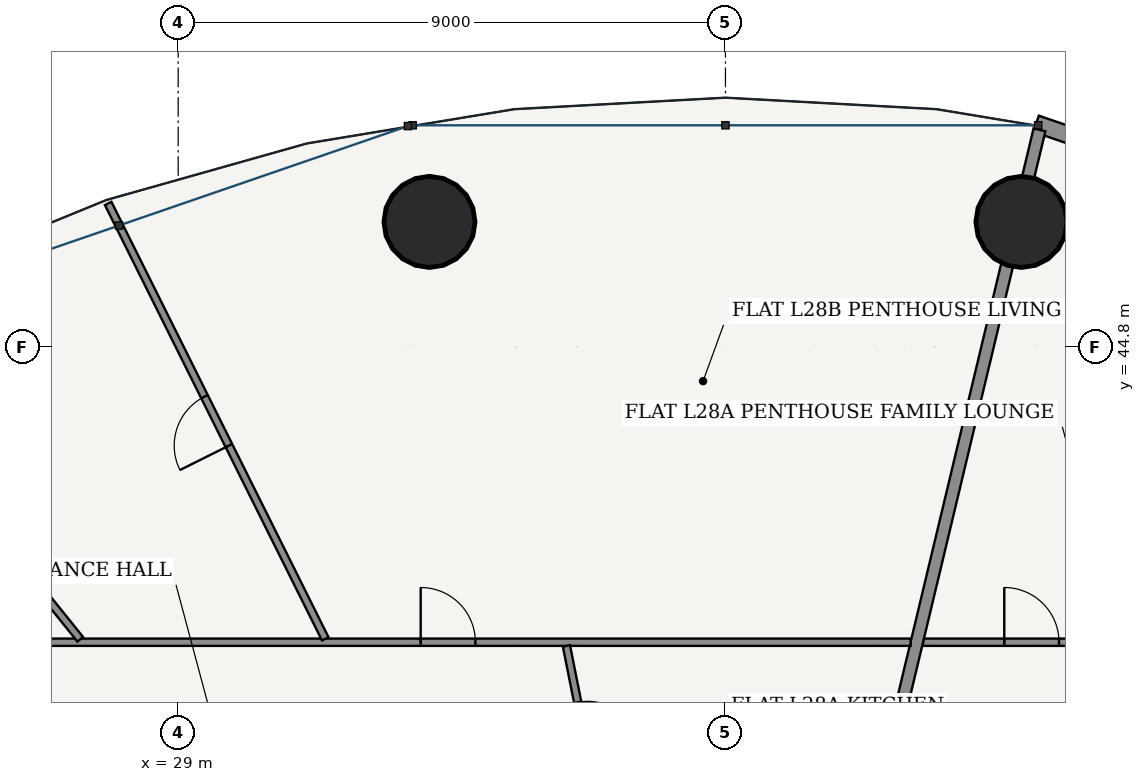
"""IFC4 building model, lengths in metres.
Left out: names, types, materials, properties, quantities, classifications, styles, units other than length and angle.
Written with IfcOpenShell. Run it as: python <this file> out.ifc"""

import sys

from ifc_helpers import new_model, si_unit, direction, frame, frame_2d, origin, origin_2d, place, context, subcontext, project, spatial, rectangle, hollow_circle, extrude, source, transform, mapped, element, fill, save


model = new_model("IFC4")
c1 = context("Model", 3, precision=1e-05, world=origin(), true_north=direction((-0.2419218956, 0.970295726276)))
c2 = subcontext(c1, "Body", "Model", "MODEL_VIEW")
j1 = project(units=[si_unit("LENGTHUNIT", "METRE"), si_unit("PLANEANGLEUNIT", "RADIAN")], contexts=[c1])
p1 = place(None, origin())
s1 = spatial("IfcSite", under=j1, at=p1, CompositionType="ELEMENT")
p2 = place(p1, origin())
s2 = spatial("IfcBuilding", under=s1, at=p2, CompositionType="ELEMENT")
p3 = place(p2, frame((0.0, 0.0, 108.6)))
s3 = spatial("IfcBuildingStorey", under=s2, at=p3, CompositionType="ELEMENT", Elevation=108.6)
for number, where, z_axis, x_axis in (
    (1, (42.867, 46.857, 0.0), (0.0, 0.0, 1.0), (1.0, 0.0, 0.0)),
    (2, (33.133, 46.857, 0.0), (0.0, 0.0, 1.0), (1.0, 0.0, 0.0)),
):
    element("IfcColumn", number, at=place(p3, frame(where, z_axis=z_axis, x_axis=x_axis)), inside=s3, PredefinedType="COLUMN", context=c2, shape_type="SweptSolid", body=[
        extrude(hollow_circle(Radius=0.75, WallThickness=0.045, at=origin_2d()), origin(), (0.0, 0.0, 1.0), 3.6),
    ])
p4 = place(p3, frame((52.837, 45.125, 0.0), z_axis=(0.0, 0.0, 1.0), x_axis=(-0.945597432299, 0.325339047809, 0.0)))
e3 = element("IfcWall", 3, at=p4, inside=s3, PredefinedType="SOLIDWALL", context=c2, shape_type="SweptSolid", body=[
    extrude(rectangle(XDim=10.289, YDim=0.28, at=frame_2d((5.145, 0.0))), origin(), (0.0, 0.0, 1.0), 3.325),
])
p5 = place(p4, frame((1.728, 0.0, 0.85)))
e4 = element("IfcOpeningElement", 4, at=p5, cuts=e3, PredefinedType="OPENING", context=c2, shape_type="SweptSolid", body=[
    extrude(rectangle(XDim=2.1, YDim=1.95, at=frame_2d((1.05, 0.975))), frame((0.0, 0.15, 0.0), z_axis=(0.0, -1.0, 0.0), x_axis=(1.0, 0.0, 0.0)), (0.0, 0.0, 1.0), 0.3),
])
p6 = place(p4, frame((6.461, 0.0, 0.85)))
e5 = element("IfcOpeningElement", 5, at=p6, cuts=e3, PredefinedType="OPENING", context=c2, shape_type="SweptSolid", body=[
    extrude(rectangle(XDim=2.1, YDim=1.95, at=frame_2d((1.05, 0.975))), frame((0.0, 0.15, 0.0), z_axis=(0.0, -1.0, 0.0), x_axis=(1.0, 0.0, 0.0)), (0.0, 0.0, 1.0), 0.3),
])
p7 = place(p3, frame((41.249, 39.945, 0.0), z_axis=(0.0, 0.0, 1.0), x_axis=(1.0, 0.0, 0.0)))
e6 = element("IfcWall", 6, at=p7, inside=s3, PredefinedType="PARTITIONING", context=c2, shape_type="SweptSolid", body=[
    extrude(rectangle(XDim=10.896, YDim=0.12, at=frame_2d((5.448, 0.0))), origin(), (0.0, 0.0, 1.0), 2.767),
])
p8 = place(p7, frame((1.336, 0.0, 0.0)))
e7 = element("IfcOpeningElement", 7, at=p8, cuts=e6, PredefinedType="OPENING", context=c2, shape_type="SweptSolid", body=[
    extrude(rectangle(XDim=0.9, YDim=2.15, at=frame_2d((0.45, 1.075))), frame((0.0, 0.07, 0.0), z_axis=(0.0, -1.0, 0.0), x_axis=(1.0, 0.0, 0.0)), (0.0, 0.0, 1.0), 0.14),
])
p9 = place(p3, frame((40.486, 37.185, 0.0), z_axis=(0.0, 0.0, 1.0), x_axis=(0.232834224261, 0.972516438942, 0.0)))
e8 = element("IfcWall", 8, at=p9, inside=s3, PredefinedType="PARTITIONING", context=c2, shape_type="SweptSolid", body=[
    extrude(rectangle(XDim=11.502, YDim=0.2, at=frame_2d((5.751, 0.0))), origin(), (0.0, 0.0, 1.0), 2.767),
])
p10 = place(p3, frame((23.855, 39.945, 0.0), z_axis=(0.0, 0.0, 1.0), x_axis=(1.0, 0.0, 0.0)))
e9 = element("IfcWall", 9, at=p10, inside=s3, PredefinedType="PARTITIONING", context=c2, shape_type="SweptSolid", body=[
    extrude(rectangle(XDim=17.19, YDim=0.12, at=frame_2d((8.595, 0.0))), origin(), (0.0, 0.0, 1.0), 2.767),
])
p11 = place(p10, frame((9.133, 0.0, 0.0)))
e10 = element("IfcOpeningElement", 10, at=p11, cuts=e9, PredefinedType="OPENING", context=c2, shape_type="SweptSolid", body=[
    extrude(rectangle(XDim=0.9, YDim=2.15, at=frame_2d((0.45, 1.075))), frame((0.0, 0.07, 0.0), z_axis=(0.0, -1.0, 0.0), x_axis=(1.0, 0.0, 0.0)), (0.0, 0.0, 1.0), 0.14),
])
p12 = place(p3, frame((31.419, 40.0, 0.0), z_axis=(0.0, 0.0, 1.0), x_axis=(-0.446188142997, 0.894939182877, 0.0)))
e11 = element("IfcWall", 11, at=p12, inside=s3, PredefinedType="PARTITIONING", context=c2, shape_type="SweptSolid", body=[
    extrude(rectangle(XDim=8.002, YDim=0.12, at=frame_2d((4.001, 0.0))), origin(), (0.0, 0.0, 1.0), 2.767),
])
p13 = place(p12, frame((3.551, 0.0, 0.0)))
e12 = element("IfcOpeningElement", 12, at=p13, cuts=e11, PredefinedType="OPENING", context=c2, shape_type="SweptSolid", body=[
    extrude(rectangle(XDim=0.9, YDim=2.15, at=frame_2d((0.45, 1.075))), frame((0.0, 0.07, 0.0), z_axis=(0.0, -1.0, 0.0), x_axis=(1.0, 0.0, 0.0)), (0.0, 0.0, 1.0), 0.14),
])
p14 = place(p3, frame((27.389, 39.993, 0.0), z_axis=(0.0, 0.0, 1.0), x_axis=(-0.626719700294, 0.779244773651, 0.0)))
e13 = element("IfcWall", 13, at=p14, inside=s3, PredefinedType="PARTITIONING", context=c2, shape_type="SweptSolid", body=[
    extrude(rectangle(XDim=6.537, YDim=0.12, at=frame_2d((3.269, 0.0))), origin(), (0.0, 0.0, 1.0), 2.767),
])
p15 = place(p3, frame((35.925, 37.185, 0.0), z_axis=(0.0, 0.0, 1.0), x_axis=(-0.196013794811, 0.980601138202, 0.0)))
e14 = element("IfcWall", 14, at=p15, inside=s3, PredefinedType="PARTITIONING", context=c2, shape_type="SweptSolid", body=[
    extrude(rectangle(XDim=2.753, YDim=0.12, at=frame_2d((1.376, 0.0))), origin(), (0.0, 0.0, 1.0), 3.325),
])
p16 = place(p15, frame((0.946, 0.0, 0.0)))
e15 = element("IfcOpeningElement", 15, at=p16, cuts=e14, PredefinedType="OPENING", context=c2, shape_type="SweptSolid", body=[
    extrude(rectangle(XDim=0.86, YDim=2.15, at=frame_2d((0.43, 1.075))), frame((0.0, 0.07, 0.0), z_axis=(0.0, -1.0, 0.0), x_axis=(1.0, 0.0, 0.0)), (0.0, 0.0, 1.0), 0.14),
])
p17 = place(p3, frame((28.335, 37.185, 0.0), z_axis=(0.0, 0.0, 1.0), x_axis=(-0.681236086606, 0.732063791145, 0.0)))
e16 = element("IfcWall", 16, at=p17, inside=s3, PredefinedType="PARTITIONING", context=c2, shape_type="SweptSolid", body=[
    extrude(rectangle(XDim=3.708, YDim=0.12, at=frame_2d((1.854, 0.0))), origin(), (0.0, 0.0, 1.0), 2.767),
])
p18 = place(p17, frame((1.404, 0.0, 0.0)))
e17 = element("IfcOpeningElement", 17, at=p18, cuts=e16, PredefinedType="OPENING", context=c2, shape_type="SweptSolid", body=[
    extrude(rectangle(XDim=0.9, YDim=2.15, at=frame_2d((0.45, 1.075))), frame((0.0, 0.07, 0.0), z_axis=(0.0, -1.0, 0.0), x_axis=(1.0, 0.0, 0.0)), (0.0, 0.0, 1.0), 0.14),
])
m1 = source(origin(), c2, "Body", "SweptSolid", [
    extrude(rectangle(XDim=0.9, YDim=2.15, at=frame_2d((0.45, 1.075))), frame((0.0, 0.025, 0.0), z_axis=(0.0, -1.0, 0.0), x_axis=(1.0, 0.0, 0.0)), (0.0, 0.0, 1.0), 0.05),
])
p19 = place(p8, origin())
e18 = element("IfcDoor", 18, at=p19, inside=s3, OperationType="SINGLE_SWING_LEFT", PredefinedType="DOOR", context=c2, shape_type="MappedRepresentation", body=[
    mapped(m1, transform((0.0, 0.0, 0.0), scale=1.0)),
])
fill(e7, e18)
m2 = source(origin(), c2, "Body", "SweptSolid", [
    extrude(rectangle(XDim=0.86, YDim=2.15, at=frame_2d((0.43, 1.075))), frame((0.0, 0.025, 0.0), z_axis=(0.0, -1.0, 0.0), x_axis=(1.0, 0.0, 0.0)), (0.0, 0.0, 1.0), 0.05),
])
p20 = place(p16, frame((0.86, 0.0, 0.0), z_axis=(0.0, 0.0, 1.0), x_axis=(-1.0, 0.0, 0.0)))
e19 = element("IfcDoor", 19, at=p20, inside=s3, OperationType="SINGLE_SWING_RIGHT", PredefinedType="DOOR", context=c2, shape_type="MappedRepresentation", body=[
    mapped(m2, transform((0.0, 0.0, 0.0), scale=1.0)),
])
fill(e15, e19)
p21 = place(p11, origin())
e20 = element("IfcDoor", 20, at=p21, inside=s3, OperationType="SINGLE_SWING_LEFT", PredefinedType="DOOR", context=c2, shape_type="MappedRepresentation", body=[
    mapped(m1, transform((0.0, 0.0, 0.0), scale=1.0)),
])
fill(e10, e20)
p22 = place(p13, origin())
e21 = element("IfcDoor", 21, at=p22, inside=s3, OperationType="SINGLE_SWING_LEFT", PredefinedType="DOOR", context=c2, shape_type="MappedRepresentation", body=[
    mapped(m1, transform((0.0, 0.0, 0.0), scale=1.0)),
])
fill(e12, e21)
save(model, sys.argv[1])
